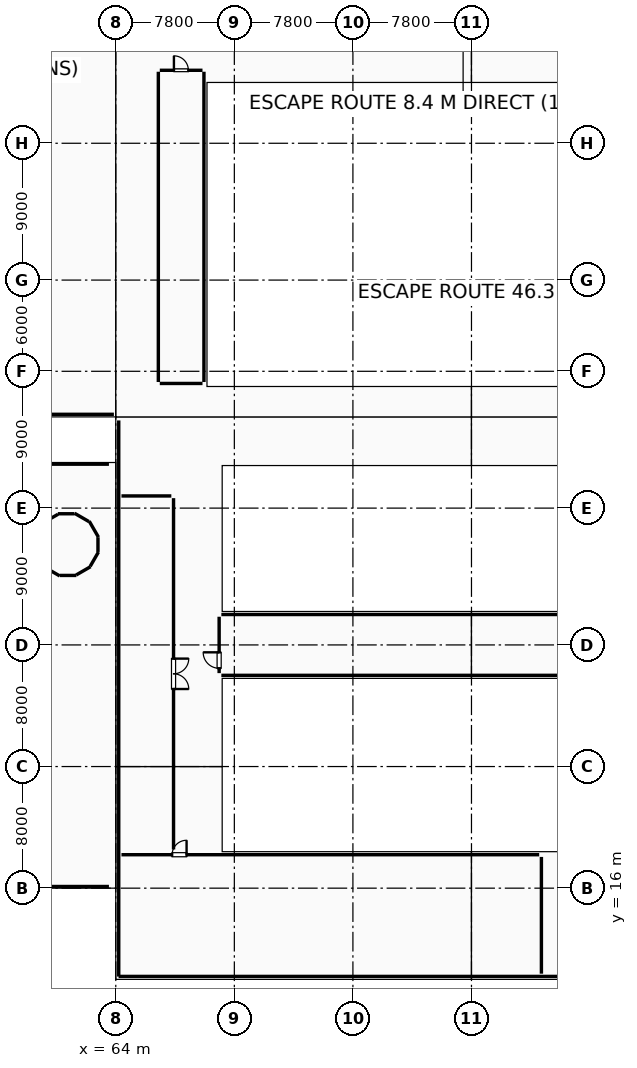
"""IFC4 building model, lengths in metres.
Left out: names, types, materials, properties, quantities, classifications, styles, units other than length and angle.
Written with IfcOpenShell. Run it as: python <this file> out.ifc"""

import sys

from ifc_helpers import new_model, si_unit, direction, frame, frame_2d, origin, origin_2d, place, context, subcontext, project, spatial, rectangle, hollow_rectangle, i_section, extrude, element, fill, save


model = new_model("IFC4")
c1 = context("Model", 3, precision=1e-05, world=origin(), true_north=direction((0.0, 1.0)))
c2 = subcontext(c1, "Body", "Model", "MODEL_VIEW")
j1 = project(units=[si_unit("LENGTHUNIT", "METRE"), si_unit("PLANEANGLEUNIT", "RADIAN")], contexts=[c1])
p1 = place(None, origin())
s1 = spatial("IfcSite", under=j1, at=p1, CompositionType="ELEMENT")
p2 = place(p1, origin())
s2 = spatial("IfcBuilding", under=s1, at=p2, CompositionType="ELEMENT")
p3 = place(p2, frame((0.0, 0.0, 19.8)))
s3 = spatial("IfcBuildingStorey", under=s2, at=p3, CompositionType="ELEMENT", Elevation=19.8)
p4 = place(p3, frame((64.0, 50.0, 0.0), z_axis=(0.0, 0.0, 1.0), x_axis=(1.0, 0.0, 0.0)))
e1 = element("IfcColumn", 1, at=p4, inside=s3, PredefinedType="COLUMN", context=c2, shape_type="SweptSolid", body=[
    extrude(hollow_rectangle(XDim=0.45, YDim=0.45, WallThickness=0.02, at=origin_2d()), origin(), (0.0, 0.0, 1.0), 4.5),
])
for number, where, z_axis, x_axis in (
    (2, (64.0, 56.0, 0.0), (0.0, 0.0, 1.0), (1.0, 0.0, 0.0)),
    (3, (64.0, 65.0, 0.0), (0.0, 0.0, 1.0), (1.0, 0.0, 0.0)),
    (4, (64.0, 47.0, 0.0), (0.0, 0.0, 1.0), (1.0, 0.0, 0.0)),
    (5, (71.8, 47.0, 0.0), (0.0, 0.0, 1.0), (1.0, 0.0, 0.0)),
    (6, (79.6, 47.0, 0.0), (0.0, 0.0, 1.0), (1.0, 0.0, 0.0)),
    (7, (87.4, 47.0, 0.0), (0.0, 0.0, 1.0), (1.0, 0.0, 0.0)),
):
    element("IfcColumn", number, at=place(p3, frame(where, z_axis=z_axis, x_axis=x_axis)), inside=s3, PredefinedType="COLUMN", context=c2, shape_type="SweptSolid", body=[
        extrude(i_section(OverallWidth=0.25, OverallDepth=0.45, WebThickness=0.011, FlangeThickness=0.014, FilletRadius=0.015, at=origin_2d()), origin(), (0.0, 0.0, 1.0), 4.5),
    ])
for number, where, z_axis, x_axis in (
    (8, (70.0, 16.0, 0.0), (0.0, 0.0, 1.0), (1.0, 0.0, 0.0)),
    (9, (70.0, 41.0, 0.0), (0.0, 0.0, 1.0), (1.0, 0.0, 0.0)),
):
    element("IfcColumn", number, at=place(p3, frame(where, z_axis=z_axis, x_axis=x_axis)), inside=s3, PredefinedType="COLUMN", context=c2, shape_type="SweptSolid", body=[
        extrude(rectangle(XDim=1.2, YDim=1.2, at=origin_2d()), origin(), (0.0, 0.0, 1.0), 4.5),
    ])
for number, where, z_axis, x_axis in (
    (10, (79.6, 16.0, 0.0), (0.0, 0.0, 1.0), (1.0, 0.0, 0.0)),
    (11, (79.6, 41.0, 0.0), (0.0, 0.0, 1.0), (1.0, 0.0, 0.0)),
    (12, (87.4, 16.0, 0.0), (0.0, 0.0, 1.0), (1.0, 0.0, 0.0)),
    (13, (87.4, 41.0, 0.0), (0.0, 0.0, 1.0), (1.0, 0.0, 0.0)),
):
    element("IfcColumn", number, at=place(p3, frame(where, z_axis=z_axis, x_axis=x_axis)), inside=s3, PredefinedType="COLUMN", context=c2, shape_type="SweptSolid", body=[
        extrude(rectangle(XDim=1.05, YDim=1.05, at=origin_2d()), origin(), (0.0, 0.0, 1.0), 4.5),
    ])
p5 = place(p3, frame((118.415, 10.195, 0.0), z_axis=(0.0, 0.0, 1.0), x_axis=(-1.0, 0.0, 0.0)))
e14 = element("IfcWall", 14, at=p5, inside=s3, PredefinedType="STANDARD", context=c2, shape_type="SweptSolid", body=[
    extrude(rectangle(XDim=54.23, YDim=0.35, at=frame_2d((27.115, 0.0))), origin(), (0.0, 0.0, 1.0), 1.25),
])
p6 = place(p3, frame((64.195, 10.185, 0.0), z_axis=(0.0, 0.0, 1.0), x_axis=(0.0, 1.0, 0.0)))
e15 = element("IfcWall", 15, at=p6, inside=s3, PredefinedType="STANDARD", context=c2, shape_type="SweptSolid", body=[
    extrude(rectangle(XDim=36.582, YDim=0.35, at=frame_2d((18.291, 0.0))), origin(), (0.0, 0.0, 1.0), 1.25),
])
p7 = place(p3, frame((63.876, 47.17, 0.0), z_axis=(0.0, 0.0, 1.0), x_axis=(-1.0, 0.0, 0.0)))
e16 = element("IfcWall", 16, at=p7, inside=s3, PredefinedType="STANDARD", context=c2, shape_type="SweptSolid", body=[
    extrude(rectangle(XDim=9.716, YDim=0.3, at=frame_2d((4.858, 0.0))), origin(), (0.0, 0.0, 1.0), 4.25),
])
p8 = place(p7, frame((3.826, 0.0, 0.95)))
e17 = element("IfcOpeningElement", 17, at=p8, cuts=e16, PredefinedType="OPENING", context=c2, shape_type="SweptSolid", body=[
    extrude(rectangle(XDim=2.1, YDim=2.1, at=frame_2d((1.05, 1.05))), frame((0.0, 0.16, 0.0), z_axis=(0.0, -1.0, 0.0), x_axis=(1.0, 0.0, 0.0)), (0.0, 0.0, 1.0), 0.32),
])
for number, where, z_axis, x_axis in (
    (18, (63.55, 16.11, 0.0), (0.0, 0.0, 1.0), (-1.0, 0.0, 0.0)),
    (19, (40.45, 43.89, 0.0), (0.0, 0.0, 1.0), (1.0, 0.0, 0.0)),
):
    element("IfcWall", number, at=place(p3, frame(where, z_axis=z_axis, x_axis=x_axis)), inside=s3, PredefinedType="PARAPET", context=c2, shape_type="SweptSolid", body=[
        extrude(rectangle(XDim=23.1, YDim=0.18, at=frame_2d((11.55, 0.0))), origin(), (0.0, 0.0, 1.0), 1.15),
    ])
p9 = place(p3, frame((62.861, 39.086, 0.0), z_axis=(0.0, 0.0, 1.0), x_axis=(-0.499930512259, 0.866065518833, 0.0)))
e20 = element("IfcWall", 20, at=p9, inside=s3, PredefinedType="SHEAR", context=c2, shape_type="SweptSolid", body=[
    extrude(rectangle(XDim=1.219, YDim=0.35, at=frame_2d((0.609, 0.0))), origin(), (0.0, 0.0, 1.0), 4.5),
])
for number, where, z_axis, x_axis in (
    (21, (62.233, 40.115, 0.0), (0.0, 0.0, 1.0), (-0.866, 0.5, 0.0)),
    (22, (61.283, 40.628, 0.0), (0.0, 0.0, 1.0), (-1.0, 0.0, 0.0)),
    (23, (60.205, 40.598, 0.0), (0.0, 0.0, 1.0), (-0.866, -0.5, 0.0)),
):
    element("IfcWall", number, at=place(p3, frame(where, z_axis=z_axis, x_axis=x_axis)), inside=s3, PredefinedType="SHEAR", context=c2, shape_type="SweptSolid", body=[
        extrude(rectangle(XDim=1.093, YDim=0.35, at=frame_2d((0.546, 0.0))), origin(), (0.0, 0.0, 1.0), 4.5),
    ])
p10 = place(p3, frame((59.367, 37.085, 0.0), z_axis=(0.0, 0.0, 1.0), x_axis=(0.866021955858, -0.500005971936, 0.0)))
e24 = element("IfcWall", 24, at=p10, inside=s3, PredefinedType="SHEAR", context=c2, shape_type="SweptSolid", body=[
    extrude(rectangle(XDim=1.093, YDim=0.35, at=frame_2d((0.547, 0.0))), origin(), (0.0, 0.0, 1.0), 4.5),
])
for number, where, z_axis, x_axis in (
    (25, (60.316, 36.572, 0.0), (0.0, 0.0, 1.0), (1.0, 0.0, 0.0)),
    (26, (61.396, 36.602, 0.0), (0.0, 0.0, 1.0), (0.866, 0.5, 0.0)),
    (27, (62.315, 37.167, 0.0), (0.0, 0.0, 1.0), (0.5, 0.866, 0.0)),
):
    element("IfcWall", number, at=place(p3, frame(where, z_axis=z_axis, x_axis=x_axis)), inside=s3, PredefinedType="SHEAR", context=c2, shape_type="SweptSolid", body=[
        extrude(rectangle(XDim=1.093, YDim=0.35, at=frame_2d((0.546, 0.0))), origin(), (0.0, 0.0, 1.0), 4.5),
    ])
p11 = place(p3, frame((62.828, 38.116, 0.0), z_axis=(0.0, 0.0, 1.0), x_axis=(0.0, 1.0, 0.0)))
e28 = element("IfcWall", 28, at=p11, inside=s3, PredefinedType="SHEAR", context=c2, shape_type="SweptSolid", body=[
    extrude(rectangle(XDim=0.967, YDim=0.35, at=frame_2d((0.483, 0.0))), origin(), (0.0, 0.0, 1.0), 4.5),
])
for number, where, z_axis, x_axis in (
    (29, (70.945, 34.0, 0.0), (0.0, 0.0, 1.0), (1.0, 0.0, 0.0)),
    (30, (118.226, 30.0, 0.0), (0.0, 0.0, 1.0), (-1.0, 0.0, 0.0)),
):
    element("IfcWall", number, at=place(p3, frame(where, z_axis=z_axis, x_axis=x_axis)), inside=s3, PredefinedType="PARTITIONING", context=c2, shape_type="SweptSolid", body=[
        extrude(rectangle(XDim=47.281, YDim=0.25, at=frame_2d((23.641, 0.0))), origin(), (0.0, 0.0, 1.0), 4.5),
    ])
p12 = place(p3, frame((70.8, 30.145, 0.0), z_axis=(0.0, 0.0, 1.0), x_axis=(0.0, 1.0, 0.0)))
e31 = element("IfcWall", 31, at=p12, inside=s3, PredefinedType="PARTITIONING", context=c2, shape_type="SweptSolid", body=[
    extrude(rectangle(XDim=3.71, YDim=0.25, at=frame_2d((1.855, 0.0))), origin(), (0.0, 0.0, 1.0), 4.5),
])
p13 = place(p12, frame((0.319, 0.0, 0.0)))
e32 = element("IfcOpeningElement", 32, at=p13, cuts=e31, PredefinedType="OPENING", context=c2, shape_type="SweptSolid", body=[
    extrude(rectangle(XDim=1.05, YDim=2.15, at=frame_2d((0.525, 1.075))), frame((0.0, 0.135, 0.0), z_axis=(0.0, -1.0, 0.0), x_axis=(1.0, 0.0, 0.0)), (0.0, 0.0, 1.0), 0.27),
])
p14 = place(p3, frame((66.895, 69.8, 0.0), z_axis=(0.0, 0.0, 1.0), x_axis=(1.0, 0.0, 0.0)))
e33 = element("IfcWall", 33, at=p14, inside=s3, PredefinedType="PARTITIONING", context=c2, shape_type="SweptSolid", body=[
    extrude(rectangle(XDim=2.81, YDim=0.15, at=frame_2d((1.405, 0.0))), origin(), (0.0, 0.0, 1.0), 4.24),
])
p15 = place(p14, frame((0.93, 0.0, 0.0)))
e34 = element("IfcOpeningElement", 34, at=p15, cuts=e33, PredefinedType="OPENING", context=c2, shape_type="SweptSolid", body=[
    extrude(rectangle(XDim=0.95, YDim=2.15, at=frame_2d((0.475, 1.075))), frame((0.0, 0.085, 0.0), z_axis=(0.0, -1.0, 0.0), x_axis=(1.0, 0.0, 0.0)), (0.0, 0.0, 1.0), 0.17),
])
p16 = place(p3, frame((69.8, 69.705, 0.0), z_axis=(0.0, 0.0, 1.0), x_axis=(0.0, -1.0, 0.0)))
e35 = element("IfcWall", 35, at=p16, inside=s3, PredefinedType="PARTITIONING", context=c2, shape_type="SweptSolid", body=[
    extrude(rectangle(XDim=20.41, YDim=0.15, at=frame_2d((10.205, 0.0))), origin(), (0.0, 0.0, 1.0), 4.24),
])
p17 = place(p3, frame((69.705, 49.2, 0.0), z_axis=(0.0, 0.0, 1.0), x_axis=(-1.0, 0.0, 0.0)))
e36 = element("IfcWall", 36, at=p17, inside=s3, PredefinedType="PARTITIONING", context=c2, shape_type="SweptSolid", body=[
    extrude(rectangle(XDim=2.81, YDim=0.15, at=frame_2d((1.405, 0.0))), origin(), (0.0, 0.0, 1.0), 4.24),
])
p18 = place(p3, frame((66.8, 49.295, 0.0), z_axis=(0.0, 0.0, 1.0), x_axis=(0.0, 1.0, 0.0)))
e37 = element("IfcWall", 37, at=p18, inside=s3, PredefinedType="PARTITIONING", context=c2, shape_type="SweptSolid", body=[
    extrude(rectangle(XDim=20.41, YDim=0.15, at=frame_2d((10.205, 0.0))), origin(), (0.0, 0.0, 1.0), 3.83),
])
p19 = place(p3, frame((64.374, 18.2, 0.0), z_axis=(0.0, 0.0, 1.0), x_axis=(1.0, 0.0, 0.0)))
e38 = element("IfcWall", 38, at=p19, inside=s3, PredefinedType="PARTITIONING", context=c2, shape_type="SweptSolid", body=[
    extrude(rectangle(XDim=27.481, YDim=0.25, at=frame_2d((13.74, 0.0))), origin(), (0.0, 0.0, 1.0), 4.5),
])
p20 = place(p19, frame((3.334, 0.0, 0.0)))
e39 = element("IfcOpeningElement", 39, at=p20, cuts=e38, PredefinedType="OPENING", context=c2, shape_type="SweptSolid", body=[
    extrude(rectangle(XDim=0.95, YDim=2.15, at=frame_2d((0.475, 1.075))), frame((0.0, 0.135, 0.0), z_axis=(0.0, -1.0, 0.0), x_axis=(1.0, 0.0, 0.0)), (0.0, 0.0, 1.0), 0.27),
])
p21 = place(p3, frame((92.0, 18.055, 0.0), z_axis=(0.0, 0.0, 1.0), x_axis=(0.0, -1.0, 0.0)))
e40 = element("IfcWall", 40, at=p21, inside=s3, PredefinedType="PARTITIONING", context=c2, shape_type="SweptSolid", body=[
    extrude(rectangle(XDim=7.681, YDim=0.25, at=frame_2d((3.84, 0.0))), origin(), (0.0, 0.0, 1.0), 4.5),
])
p22 = place(p3, frame((64.374, 41.8, 0.0), z_axis=(0.0, 0.0, 1.0), x_axis=(1.0, 0.0, 0.0)))
e41 = element("IfcWall", 41, at=p22, inside=s3, PredefinedType="PARTITIONING", context=c2, shape_type="SweptSolid", body=[
    extrude(rectangle(XDim=3.281, YDim=0.25, at=frame_2d((1.641, 0.0))), origin(), (0.0, 0.0, 1.0), 4.5),
])
p23 = place(p3, frame((67.8, 41.655, 0.0), z_axis=(0.0, 0.0, 1.0), x_axis=(0.0, -1.0, 0.0)))
e42 = element("IfcWall", 42, at=p23, inside=s3, PredefinedType="PARTITIONING", context=c2, shape_type="SweptSolid", body=[
    extrude(rectangle(XDim=23.11, YDim=0.25, at=frame_2d((11.555, 0.0))), origin(), (0.0, 0.0, 1.0), 4.5),
])
p24 = place(p23, frame((10.555, 0.0, 0.0)))
e43 = element("IfcOpeningElement", 43, at=p24, cuts=e42, PredefinedType="OPENING", context=c2, shape_type="SweptSolid", body=[
    extrude(rectangle(XDim=2.0, YDim=2.35, at=frame_2d((1.0, 1.175))), frame((0.0, 0.135, 0.0), z_axis=(0.0, -1.0, 0.0), x_axis=(1.0, 0.0, 0.0)), (0.0, 0.0, 1.0), 0.27),
])
p25 = place(p8, origin())
e44 = element("IfcWindow", 44, at=p25, inside=s3, PartitioningType="SINGLE_PANEL", PredefinedType="LIGHTDOME", context=c2, shape_type="SweptSolid", body=[
    extrude(rectangle(XDim=2.1, YDim=2.1, at=frame_2d((1.05, 1.05))), frame((0.0, 0.03, 0.0), z_axis=(0.0, -1.0, 0.0), x_axis=(1.0, 0.0, 0.0)), (0.0, 0.0, 1.0), 0.06),
])
fill(e17, e44)
p26 = place(p13, origin())
e45 = element("IfcDoor", 45, at=p26, inside=s3, OperationType="SINGLE_SWING_RIGHT", PredefinedType="DOOR", context=c2, shape_type="SweptSolid", body=[
    extrude(rectangle(XDim=1.05, YDim=2.15, at=frame_2d((0.525, 1.075))), frame((0.0, 0.025, 0.0), z_axis=(0.0, -1.0, 0.0), x_axis=(1.0, 0.0, 0.0)), (0.0, 0.0, 1.0), 0.05),
])
fill(e32, e45)
p27 = place(p15, origin())
e46 = element("IfcDoor", 46, at=p27, inside=s3, OperationType="SINGLE_SWING_LEFT", PredefinedType="DOOR", context=c2, shape_type="SweptSolid", body=[
    extrude(rectangle(XDim=0.95, YDim=2.15, at=frame_2d((0.475, 1.075))), frame((0.0, 0.025, 0.0), z_axis=(0.0, -1.0, 0.0), x_axis=(1.0, 0.0, 0.0)), (0.0, 0.0, 1.0), 0.05),
])
fill(e34, e46)
p28 = place(p20, origin())
e47 = element("IfcDoor", 47, at=p28, inside=s3, OperationType="SINGLE_SWING_RIGHT", PredefinedType="DOOR", context=c2, shape_type="SweptSolid", body=[
    extrude(rectangle(XDim=0.95, YDim=2.15, at=frame_2d((0.475, 1.075))), frame((0.0, 0.025, 0.0), z_axis=(0.0, -1.0, 0.0), x_axis=(1.0, 0.0, 0.0)), (0.0, 0.0, 1.0), 0.05),
])
fill(e39, e47)
p29 = place(p24, origin())
e48 = element("IfcDoor", 48, at=p29, inside=s3, OperationType="DOUBLE_SWING_LEFT", PredefinedType="DOOR", context=c2, shape_type="SweptSolid", body=[
    extrude(rectangle(XDim=2.0, YDim=2.35, at=frame_2d((1.0, 1.175))), frame((0.0, 0.025, 0.0), z_axis=(0.0, -1.0, 0.0), x_axis=(1.0, 0.0, 0.0)), (0.0, 0.0, 1.0), 0.05),
])
fill(e43, e48)
save(model, sys.argv[1])
